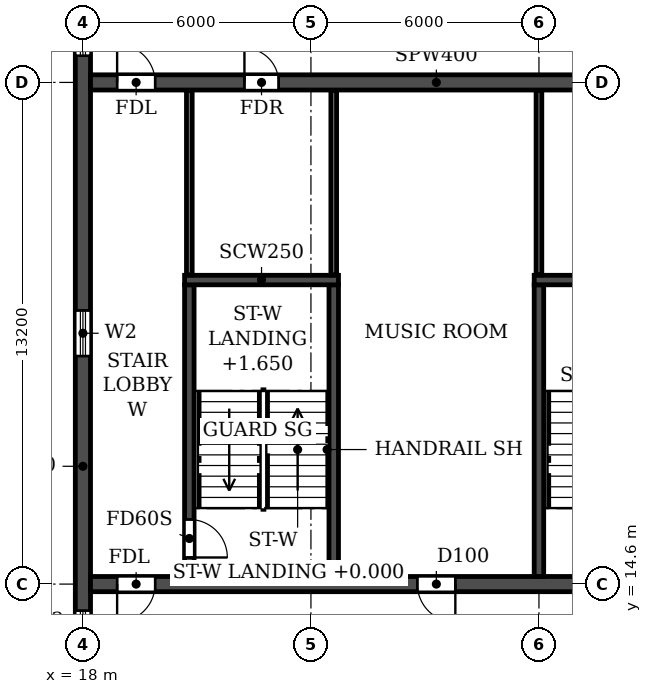
"""IFC4 building model, lengths in metres.
Left out: names, types, materials, properties, quantities, classifications, styles, units other than length and angle.
Written with IfcOpenShell. Run it as: python <this file> out.ifc"""

import sys

from ifc_helpers import new_model, si_unit, direction, frame, frame_2d, origin, place, context, subcontext, project, spatial, rectangle, extrude, element, fill, save


model = new_model("IFC4")
c1 = context("Model", 3, precision=1e-05, world=origin(), true_north=direction((0.0, 1.0)))
c2 = subcontext(c1, "Body", "Model", "MODEL_VIEW")
j1 = project(units=[si_unit("LENGTHUNIT", "METRE"), si_unit("PLANEANGLEUNIT", "RADIAN")], contexts=[c1])
p1 = place(None, origin())
s1 = spatial("IfcSite", under=j1, at=p1, CompositionType="ELEMENT")
p2 = place(p1, origin())
s2 = spatial("IfcBuilding", under=s1, at=p2, CompositionType="ELEMENT")
p3 = place(p2, frame((0.0, 0.0, 175.2)))
s3 = spatial("IfcBuildingStorey", under=s2, at=p3, CompositionType="ELEMENT", Elevation=175.2)
p4 = place(p3, frame((18.0, 4.683, 0.0), z_axis=(0.0, 0.0, 1.0), x_axis=(0.0, 1.0, 0.0)))
e1 = element("IfcWall", 1, at=p4, inside=s3, PredefinedType="SHEAR", context=c2, shape_type="SweptSolid", body=[
    extrude(rectangle(XDim=31.834, YDim=0.4, at=frame_2d((15.917, 0.0))), origin(), (0.0, 0.0, 1.0), 3.08),
])
p5 = place(p4, frame((23.817, 0.0, 0.9)))
e2 = element("IfcOpeningElement", 2, at=p5, cuts=e1, PredefinedType="OPENING", context=c2, shape_type="SweptSolid", body=[
    extrude(rectangle(XDim=1.2, YDim=1.5, at=frame_2d((0.6, 0.75))), frame((0.0, 0.21, 0.0), z_axis=(0.0, -1.0, 0.0), x_axis=(1.0, 0.0, 0.0)), (0.0, 0.0, 1.0), 0.42),
])
p6 = place(p4, frame((8.017, 0.0, 0.9)))
e3 = element("IfcOpeningElement", 3, at=p6, cuts=e1, PredefinedType="OPENING", context=c2, shape_type="SweptSolid", body=[
    extrude(rectangle(XDim=1.2, YDim=1.5, at=frame_2d((0.6, 0.75))), frame((0.0, 0.21, 0.0), z_axis=(0.0, -1.0, 0.0), x_axis=(1.0, 0.0, 0.0)), (0.0, 0.0, 1.0), 0.42),
])
p7 = place(p4, frame((27.694, 0.0, 0.6)))
e4 = element("IfcOpeningElement", 4, at=p7, cuts=e1, PredefinedType="OPENING", context=c2, shape_type="SweptSolid", body=[
    extrude(rectangle(XDim=2.2, YDim=1.8, at=frame_2d((1.1, 0.9))), frame((0.0, 0.21, 0.0), z_axis=(0.0, -1.0, 0.0), x_axis=(1.0, 0.0, 0.0)), (0.0, 0.0, 1.0), 0.42),
])
p8 = place(p4, frame((2.541, 0.0, 0.6)))
e5 = element("IfcOpeningElement", 5, at=p8, cuts=e1, PredefinedType="OPENING", context=c2, shape_type="SweptSolid", body=[
    extrude(rectangle(XDim=2.2, YDim=1.8, at=frame_2d((1.1, 0.9))), frame((0.0, 0.21, 0.0), z_axis=(0.0, -1.0, 0.0), x_axis=(1.0, 0.0, 0.0)), (0.0, 0.0, 1.0), 0.42),
])
p9 = place(p4, frame((15.917, 0.0, 0.9)))
e6 = element("IfcOpeningElement", 6, at=p9, cuts=e1, PredefinedType="OPENING", context=c2, shape_type="SweptSolid", body=[
    extrude(rectangle(XDim=1.2, YDim=1.5, at=frame_2d((0.6, 0.75))), frame((0.0, 0.21, 0.0), z_axis=(0.0, -1.0, 0.0), x_axis=(1.0, 0.0, 0.0)), (0.0, 0.0, 1.0), 0.42),
])
p10 = place(p3, frame((18.2, 14.6, 0.0), z_axis=(0.0, 0.0, 1.0), x_axis=(1.0, 0.0, 0.0)))
e7 = element("IfcWall", 7, at=p10, inside=s3, PredefinedType="SOLIDWALL", context=c2, shape_type="SweptSolid", body=[
    extrude(rectangle(XDim=65.6, YDim=0.4, at=frame_2d((32.8, 0.0))), origin(), (0.0, 0.0, 1.0), 3.08),
])
p11 = place(p10, frame((0.7, 0.0, 0.0)))
e8 = element("IfcOpeningElement", 8, at=p11, cuts=e7, PredefinedType="OPENING", context=c2, shape_type="SweptSolid", body=[
    extrude(rectangle(XDim=1.0, YDim=2.1, at=frame_2d((0.5, 1.05))), frame((0.0, 0.21, 0.0), z_axis=(0.0, -1.0, 0.0), x_axis=(1.0, 0.0, 0.0)), (0.0, 0.0, 1.0), 0.42),
])
p12 = place(p10, frame((8.6, 0.0, 0.0)))
e9 = element("IfcOpeningElement", 9, at=p12, cuts=e7, PredefinedType="OPENING", context=c2, shape_type="SweptSolid", body=[
    extrude(rectangle(XDim=1.0, YDim=2.1, at=frame_2d((0.5, 1.05))), frame((0.0, 0.21, 0.0), z_axis=(0.0, -1.0, 0.0), x_axis=(1.0, 0.0, 0.0)), (0.0, 0.0, 1.0), 0.42),
])
p13 = place(p10, frame((13.2, 0.0, 0.0)))
e10 = element("IfcOpeningElement", 10, at=p13, cuts=e7, PredefinedType="OPENING", context=c2, shape_type="SweptSolid", body=[
    extrude(rectangle(XDim=1.0, YDim=2.1, at=frame_2d((0.5, 1.05))), frame((0.0, 0.21, 0.0), z_axis=(0.0, -1.0, 0.0), x_axis=(1.0, 0.0, 0.0)), (0.0, 0.0, 1.0), 0.42),
])
p14 = place(p10, frame((25.8, 0.0, 0.0)))
e11 = element("IfcOpeningElement", 11, at=p14, cuts=e7, PredefinedType="OPENING", context=c2, shape_type="SweptSolid", body=[
    extrude(rectangle(XDim=1.0, YDim=2.1, at=frame_2d((0.5, 1.05))), frame((0.0, 0.21, 0.0), z_axis=(0.0, -1.0, 0.0), x_axis=(1.0, 0.0, 0.0)), (0.0, 0.0, 1.0), 0.42),
])
p15 = place(p10, frame((29.7, 0.0, 0.0)))
e12 = element("IfcOpeningElement", 12, at=p15, cuts=e7, PredefinedType="OPENING", context=c2, shape_type="SweptSolid", body=[
    extrude(rectangle(XDim=1.0, YDim=2.1, at=frame_2d((0.5, 1.05))), frame((0.0, 0.21, 0.0), z_axis=(0.0, -1.0, 0.0), x_axis=(1.0, 0.0, 0.0)), (0.0, 0.0, 1.0), 0.42),
])
p16 = place(p10, frame((32.3, 0.0, 0.0)))
e13 = element("IfcOpeningElement", 13, at=p16, cuts=e7, PredefinedType="OPENING", context=c2, shape_type="SweptSolid", body=[
    extrude(rectangle(XDim=1.0, YDim=2.1, at=frame_2d((0.5, 1.05))), frame((0.0, 0.21, 0.0), z_axis=(0.0, -1.0, 0.0), x_axis=(1.0, 0.0, 0.0)), (0.0, 0.0, 1.0), 0.42),
])
p17 = place(p10, frame((37.5, 0.0, 0.0)))
e14 = element("IfcOpeningElement", 14, at=p17, cuts=e7, PredefinedType="OPENING", context=c2, shape_type="SweptSolid", body=[
    extrude(rectangle(XDim=1.0, YDim=2.1, at=frame_2d((0.5, 1.05))), frame((0.0, 0.21, 0.0), z_axis=(0.0, -1.0, 0.0), x_axis=(1.0, 0.0, 0.0)), (0.0, 0.0, 1.0), 0.42),
])
p18 = place(p10, frame((51.4, 0.0, 0.0)))
e15 = element("IfcOpeningElement", 15, at=p18, cuts=e7, PredefinedType="OPENING", context=c2, shape_type="SweptSolid", body=[
    extrude(rectangle(XDim=1.0, YDim=2.1, at=frame_2d((0.5, 1.05))), frame((0.0, 0.21, 0.0), z_axis=(0.0, -1.0, 0.0), x_axis=(1.0, 0.0, 0.0)), (0.0, 0.0, 1.0), 0.42),
])
p19 = place(p10, frame((56.0, 0.0, 0.0)))
e16 = element("IfcOpeningElement", 16, at=p19, cuts=e7, PredefinedType="OPENING", context=c2, shape_type="SweptSolid", body=[
    extrude(rectangle(XDim=1.0, YDim=2.1, at=frame_2d((0.5, 1.05))), frame((0.0, 0.21, 0.0), z_axis=(0.0, -1.0, 0.0), x_axis=(1.0, 0.0, 0.0)), (0.0, 0.0, 1.0), 0.42),
])
p20 = place(p10, frame((63.9, 0.0, 0.0)))
e17 = element("IfcOpeningElement", 17, at=p20, cuts=e7, PredefinedType="OPENING", context=c2, shape_type="SweptSolid", body=[
    extrude(rectangle(XDim=1.0, YDim=2.1, at=frame_2d((0.5, 1.05))), frame((0.0, 0.21, 0.0), z_axis=(0.0, -1.0, 0.0), x_axis=(1.0, 0.0, 0.0)), (0.0, 0.0, 1.0), 0.42),
])
p21 = place(p3, frame((18.2, 27.8, 0.0), z_axis=(0.0, 0.0, 1.0), x_axis=(1.0, 0.0, 0.0)))
e18 = element("IfcWall", 18, at=p21, inside=s3, PredefinedType="SOLIDWALL", context=c2, shape_type="SweptSolid", body=[
    extrude(rectangle(XDim=65.6, YDim=0.4, at=frame_2d((32.8, 0.0))), origin(), (0.0, 0.0, 1.0), 3.08),
])
p22 = place(p21, frame((0.7, 0.0, 0.0)))
e19 = element("IfcOpeningElement", 19, at=p22, cuts=e18, PredefinedType="OPENING", context=c2, shape_type="SweptSolid", body=[
    extrude(rectangle(XDim=1.0, YDim=2.1, at=frame_2d((0.5, 1.05))), frame((0.0, 0.21, 0.0), z_axis=(0.0, -1.0, 0.0), x_axis=(1.0, 0.0, 0.0)), (0.0, 0.0, 1.0), 0.42),
])
p23 = place(p21, frame((4.05, 0.0, 0.0)))
e20 = element("IfcOpeningElement", 20, at=p23, cuts=e18, PredefinedType="OPENING", context=c2, shape_type="SweptSolid", body=[
    extrude(rectangle(XDim=0.9, YDim=2.1, at=frame_2d((0.45, 1.05))), frame((0.0, 0.21, 0.0), z_axis=(0.0, -1.0, 0.0), x_axis=(1.0, 0.0, 0.0)), (0.0, 0.0, 1.0), 0.42),
])
p24 = place(p21, frame((13.25, 0.0, 0.0)))
e21 = element("IfcOpeningElement", 21, at=p24, cuts=e18, PredefinedType="OPENING", context=c2, shape_type="SweptSolid", body=[
    extrude(rectangle(XDim=0.9, YDim=2.1, at=frame_2d((0.45, 1.05))), frame((0.0, 0.21, 0.0), z_axis=(0.0, -1.0, 0.0), x_axis=(1.0, 0.0, 0.0)), (0.0, 0.0, 1.0), 0.42),
])
p25 = place(p21, frame((17.7, 0.0, 0.0)))
e22 = element("IfcOpeningElement", 22, at=p25, cuts=e18, PredefinedType="OPENING", context=c2, shape_type="SweptSolid", body=[
    extrude(rectangle(XDim=1.0, YDim=2.1, at=frame_2d((0.5, 1.05))), frame((0.0, 0.21, 0.0), z_axis=(0.0, -1.0, 0.0), x_axis=(1.0, 0.0, 0.0)), (0.0, 0.0, 1.0), 0.42),
])
p26 = place(p21, frame((22.9, 0.0, 0.0)))
e23 = element("IfcOpeningElement", 23, at=p26, cuts=e18, PredefinedType="OPENING", context=c2, shape_type="SweptSolid", body=[
    extrude(rectangle(XDim=1.0, YDim=2.1, at=frame_2d((0.5, 1.05))), frame((0.0, 0.21, 0.0), z_axis=(0.0, -1.0, 0.0), x_axis=(1.0, 0.0, 0.0)), (0.0, 0.0, 1.0), 0.42),
])
p27 = place(p21, frame((29.4, 0.0, 0.0)))
e24 = element("IfcOpeningElement", 24, at=p27, cuts=e18, PredefinedType="OPENING", context=c2, shape_type="SweptSolid", body=[
    extrude(rectangle(XDim=1.0, YDim=2.1, at=frame_2d((0.5, 1.05))), frame((0.0, 0.21, 0.0), z_axis=(0.0, -1.0, 0.0), x_axis=(1.0, 0.0, 0.0)), (0.0, 0.0, 1.0), 0.42),
])
p28 = place(p21, frame((32.3, 0.0, 0.0)))
e25 = element("IfcOpeningElement", 25, at=p28, cuts=e18, PredefinedType="OPENING", context=c2, shape_type="SweptSolid", body=[
    extrude(rectangle(XDim=1.0, YDim=2.1, at=frame_2d((0.5, 1.05))), frame((0.0, 0.21, 0.0), z_axis=(0.0, -1.0, 0.0), x_axis=(1.0, 0.0, 0.0)), (0.0, 0.0, 1.0), 0.42),
])
p29 = place(p21, frame((36.5, 0.0, 0.0)))
e26 = element("IfcOpeningElement", 26, at=p29, cuts=e18, PredefinedType="OPENING", context=c2, shape_type="SweptSolid", body=[
    extrude(rectangle(XDim=1.0, YDim=2.1, at=frame_2d((0.5, 1.05))), frame((0.0, 0.21, 0.0), z_axis=(0.0, -1.0, 0.0), x_axis=(1.0, 0.0, 0.0)), (0.0, 0.0, 1.0), 0.42),
])
p30 = place(p21, frame((41.7, 0.0, 0.0)))
e27 = element("IfcOpeningElement", 27, at=p30, cuts=e18, PredefinedType="OPENING", context=c2, shape_type="SweptSolid", body=[
    extrude(rectangle(XDim=1.0, YDim=2.1, at=frame_2d((0.5, 1.05))), frame((0.0, 0.21, 0.0), z_axis=(0.0, -1.0, 0.0), x_axis=(1.0, 0.0, 0.0)), (0.0, 0.0, 1.0), 0.42),
])
p31 = place(p21, frame((45.6, 0.0, 0.0)))
e28 = element("IfcOpeningElement", 28, at=p31, cuts=e18, PredefinedType="OPENING", context=c2, shape_type="SweptSolid", body=[
    extrude(rectangle(XDim=1.0, YDim=2.1, at=frame_2d((0.5, 1.05))), frame((0.0, 0.21, 0.0), z_axis=(0.0, -1.0, 0.0), x_axis=(1.0, 0.0, 0.0)), (0.0, 0.0, 1.0), 0.42),
])
p32 = place(p21, frame((48.2, 0.0, 0.0)))
e29 = element("IfcOpeningElement", 29, at=p32, cuts=e18, PredefinedType="OPENING", context=c2, shape_type="SweptSolid", body=[
    extrude(rectangle(XDim=1.0, YDim=2.1, at=frame_2d((0.5, 1.05))), frame((0.0, 0.21, 0.0), z_axis=(0.0, -1.0, 0.0), x_axis=(1.0, 0.0, 0.0)), (0.0, 0.0, 1.0), 0.42),
])
p33 = place(p21, frame((51.45, 0.0, 0.0)))
e30 = element("IfcOpeningElement", 30, at=p33, cuts=e18, PredefinedType="OPENING", context=c2, shape_type="SweptSolid", body=[
    extrude(rectangle(XDim=0.9, YDim=2.1, at=frame_2d((0.45, 1.05))), frame((0.0, 0.21, 0.0), z_axis=(0.0, -1.0, 0.0), x_axis=(1.0, 0.0, 0.0)), (0.0, 0.0, 1.0), 0.42),
])
p34 = place(p21, frame((60.65, 0.0, 0.0)))
e31 = element("IfcOpeningElement", 31, at=p34, cuts=e18, PredefinedType="OPENING", context=c2, shape_type="SweptSolid", body=[
    extrude(rectangle(XDim=0.9, YDim=2.1, at=frame_2d((0.45, 1.05))), frame((0.0, 0.21, 0.0), z_axis=(0.0, -1.0, 0.0), x_axis=(1.0, 0.0, 0.0)), (0.0, 0.0, 1.0), 0.42),
])
p35 = place(p21, frame((63.9, 0.0, 0.0)))
e32 = element("IfcOpeningElement", 32, at=p35, cuts=e18, PredefinedType="OPENING", context=c2, shape_type="SweptSolid", body=[
    extrude(rectangle(XDim=1.0, YDim=2.1, at=frame_2d((0.5, 1.05))), frame((0.0, 0.21, 0.0), z_axis=(0.0, -1.0, 0.0), x_axis=(1.0, 0.0, 0.0)), (0.0, 0.0, 1.0), 0.42),
])
p36 = place(p3, frame((30.0, 14.8, 0.0), z_axis=(0.0, 0.0, 1.0), x_axis=(0.0, 1.0, 0.0)))
e33 = element("IfcWall", 33, at=p36, inside=s3, PredefinedType="SOLIDWALL", context=c2, shape_type="SweptSolid", body=[
    extrude(rectangle(XDim=7.675, YDim=0.25, at=frame_2d((3.837, 0.0))), origin(), (0.0, 0.0, 1.0), 3.08),
])
p37 = place(p3, frame((29.875, 22.6, 0.0), z_axis=(0.0, 0.0, 1.0), x_axis=(1.0, 0.0, 0.0)))
e34 = element("IfcWall", 34, at=p37, inside=s3, PredefinedType="SOLIDWALL", context=c2, shape_type="SweptSolid", body=[
    extrude(rectangle(XDim=4.05, YDim=0.25, at=frame_2d((2.025, 0.0))), origin(), (0.0, 0.0, 1.0), 3.08),
])
p38 = place(p3, frame((20.8, 14.8, 0.0), z_axis=(0.0, 0.0, 1.0), x_axis=(0.0, 1.0, 0.0)))
e35 = element("IfcWall", 35, at=p38, inside=s3, PredefinedType="SOLIDWALL", context=c2, shape_type="SweptSolid", body=[
    extrude(rectangle(XDim=7.675, YDim=0.25, at=frame_2d((3.837, 0.0))), origin(), (0.0, 0.0, 1.0), 3.08),
])
p39 = place(p38, frame((0.5, 0.0, 0.0)))
e36 = element("IfcOpeningElement", 36, at=p39, cuts=e35, PredefinedType="OPENING", context=c2, shape_type="SweptSolid", body=[
    extrude(rectangle(XDim=1.0, YDim=2.1, at=frame_2d((0.5, 1.05))), frame((0.0, 0.135, 0.0), z_axis=(0.0, -1.0, 0.0), x_axis=(1.0, 0.0, 0.0)), (0.0, 0.0, 1.0), 0.27),
])
p40 = place(p3, frame((24.6, 14.8, 0.0), z_axis=(0.0, 0.0, 1.0), x_axis=(0.0, 1.0, 0.0)))
e37 = element("IfcWall", 37, at=p40, inside=s3, PredefinedType="SOLIDWALL", context=c2, shape_type="SweptSolid", body=[
    extrude(rectangle(XDim=7.675, YDim=0.25, at=frame_2d((3.837, 0.0))), origin(), (0.0, 0.0, 1.0), 3.08),
])
p41 = place(p3, frame((20.675, 22.6, 0.0), z_axis=(0.0, 0.0, 1.0), x_axis=(1.0, 0.0, 0.0)))
e38 = element("IfcWall", 38, at=p41, inside=s3, PredefinedType="SOLIDWALL", context=c2, shape_type="SweptSolid", body=[
    extrude(rectangle(XDim=4.05, YDim=0.25, at=frame_2d((2.025, 0.0))), origin(), (0.0, 0.0, 1.0), 3.08),
])
for number, where, z_axis, x_axis in (
    (39, (20.8, 22.735, 0.0), (0.0, 0.0, 1.0), (0.0, 1.0, 0.0)),
    (40, (24.6, 22.735, 0.0), (0.0, 0.0, 1.0), (0.0, 1.0, 0.0)),
    (41, (30.0, 22.735, 0.0), (0.0, 0.0, 1.0), (0.0, 1.0, 0.0)),
):
    element("IfcWall", number, at=place(p3, frame(where, z_axis=z_axis, x_axis=x_axis)), inside=s3, PredefinedType="PARTITIONING", context=c2, shape_type="SweptSolid", body=[
        extrude(rectangle(XDim=4.855, YDim=0.15, at=frame_2d((2.427, 0.0))), origin(), (0.0, 0.0, 1.0), 3.08),
    ])
p42 = place(p5, origin())
e42 = element("IfcWindow", 42, at=p42, inside=s3, PartitioningType="SINGLE_PANEL", PredefinedType="WINDOW", context=c2, shape_type="SweptSolid", body=[
    extrude(rectangle(XDim=1.2, YDim=1.5, at=frame_2d((0.6, 0.75))), frame((0.0, 0.03, 0.0), z_axis=(0.0, -1.0, 0.0), x_axis=(1.0, 0.0, 0.0)), (0.0, 0.0, 1.0), 0.06),
])
fill(e2, e42)
p43 = place(p6, origin())
e43 = element("IfcWindow", 43, at=p43, inside=s3, PartitioningType="SINGLE_PANEL", PredefinedType="WINDOW", context=c2, shape_type="SweptSolid", body=[
    extrude(rectangle(XDim=1.2, YDim=1.5, at=frame_2d((0.6, 0.75))), frame((0.0, 0.03, 0.0), z_axis=(0.0, -1.0, 0.0), x_axis=(1.0, 0.0, 0.0)), (0.0, 0.0, 1.0), 0.06),
])
fill(e3, e43)
p44 = place(p9, origin())
e44 = element("IfcWindow", 44, at=p44, inside=s3, PartitioningType="SINGLE_PANEL", PredefinedType="WINDOW", context=c2, shape_type="SweptSolid", body=[
    extrude(rectangle(XDim=1.2, YDim=1.5, at=frame_2d((0.6, 0.75))), frame((0.0, 0.03, 0.0), z_axis=(0.0, -1.0, 0.0), x_axis=(1.0, 0.0, 0.0)), (0.0, 0.0, 1.0), 0.06),
])
fill(e6, e44)
p45 = place(p22, origin())
e45 = element("IfcDoor", 45, at=p45, inside=s3, OperationType="SINGLE_SWING_LEFT", PredefinedType="DOOR", context=c2, shape_type="SweptSolid", body=[
    extrude(rectangle(XDim=1.0, YDim=2.1, at=frame_2d((0.5, 1.05))), frame((0.0, 0.025, 0.0), z_axis=(0.0, -1.0, 0.0), x_axis=(1.0, 0.0, 0.0)), (0.0, 0.0, 1.0), 0.05),
])
fill(e19, e45)
p46 = place(p23, origin())
e46 = element("IfcDoor", 46, at=p46, inside=s3, OperationType="SINGLE_SWING_LEFT", PredefinedType="DOOR", context=c2, shape_type="SweptSolid", body=[
    extrude(rectangle(XDim=0.9, YDim=2.1, at=frame_2d((0.45, 1.05))), frame((0.0, 0.025, 0.0), z_axis=(0.0, -1.0, 0.0), x_axis=(1.0, 0.0, 0.0)), (0.0, 0.0, 1.0), 0.05),
])
fill(e20, e46)
p47 = place(p11, frame((1.0, 0.0, 0.0), z_axis=(0.0, 0.0, 1.0), x_axis=(-1.0, 0.0, 0.0)))
e47 = element("IfcDoor", 47, at=p47, inside=s3, OperationType="SINGLE_SWING_RIGHT", PredefinedType="DOOR", context=c2, shape_type="SweptSolid", body=[
    extrude(rectangle(XDim=1.0, YDim=2.1, at=frame_2d((0.5, 1.05))), frame((0.0, 0.025, 0.0), z_axis=(0.0, -1.0, 0.0), x_axis=(1.0, 0.0, 0.0)), (0.0, 0.0, 1.0), 0.05),
])
fill(e8, e47)
p48 = place(p12, frame((1.0, 0.0, 0.0), z_axis=(0.0, 0.0, 1.0), x_axis=(-1.0, 0.0, 0.0)))
e48 = element("IfcDoor", 48, at=p48, inside=s3, OperationType="SINGLE_SWING_LEFT", PredefinedType="DOOR", context=c2, shape_type="SweptSolid", body=[
    extrude(rectangle(XDim=1.0, YDim=2.1, at=frame_2d((0.5, 1.05))), frame((0.0, 0.025, 0.0), z_axis=(0.0, -1.0, 0.0), x_axis=(1.0, 0.0, 0.0)), (0.0, 0.0, 1.0), 0.05),
])
fill(e9, e48)
p49 = place(p39, frame((1.0, 0.0, 0.0), z_axis=(0.0, 0.0, 1.0), x_axis=(-1.0, 0.0, 0.0)))
e49 = element("IfcDoor", 49, at=p49, inside=s3, OperationType="SINGLE_SWING_RIGHT", PredefinedType="DOOR", context=c2, shape_type="SweptSolid", body=[
    extrude(rectangle(XDim=1.0, YDim=2.1, at=frame_2d((0.5, 1.05))), frame((0.0, 0.025, 0.0), z_axis=(0.0, -1.0, 0.0), x_axis=(1.0, 0.0, 0.0)), (0.0, 0.0, 1.0), 0.05),
])
fill(e36, e49)
save(model, sys.argv[1])
